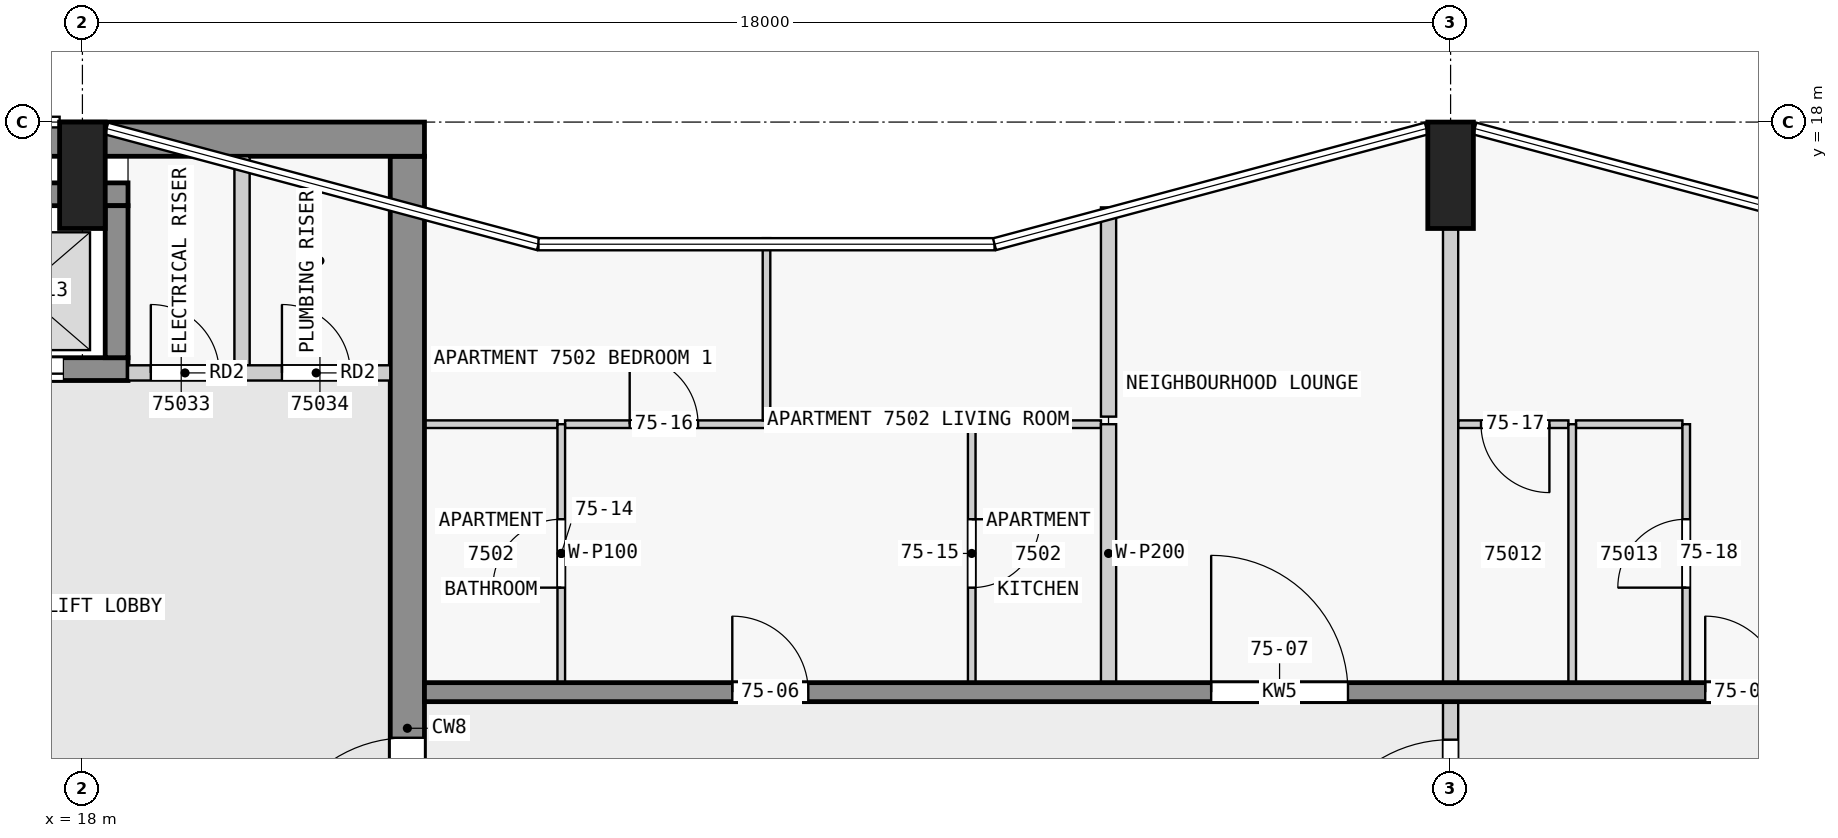
"""IFC4 building model, lengths in metres.
Left out: names, types, materials, properties, quantities, classifications, styles, units other than length and angle.
Written with IfcOpenShell. Run it as: python <this file> out.ifc"""

import sys

from ifc_helpers import new_model, si_unit, direction, frame, frame_2d, origin, origin_2d, place, context, subcontext, project, spatial, rectangle, extrude, element, fill, save


model = new_model("IFC4")
c1 = context("Model", 3, precision=1e-05, world=origin(), true_north=direction((0.0, 1.0)))
c2 = subcontext(c1, "Body", "Model", "MODEL_VIEW")
j1 = project(units=[si_unit("LENGTHUNIT", "METRE"), si_unit("PLANEANGLEUNIT", "RADIAN")], contexts=[c1])
p1 = place(None, origin())
s1 = spatial("IfcSite", under=j1, at=p1, CompositionType="ELEMENT")
p2 = place(p1, origin())
s2 = spatial("IfcBuilding", under=s1, at=p2, CompositionType="ELEMENT")
p3 = place(p2, frame((0.0, 0.0, 284.4)))
s3 = spatial("IfcBuildingStorey", under=s2, at=p3, CompositionType="ELEMENT", Elevation=284.4)
for number, where, z_axis, x_axis in (
    (1, (36.0, 17.3, 0.0), (0.0, 0.0, 1.0), (1.0, 0.0, 0.0)),
    (2, (18.0, 17.3, 0.0), (0.0, 0.0, 1.0), (1.0, 0.0, 0.0)),
):
    element("IfcColumn", number, at=place(p3, frame(where, z_axis=z_axis, x_axis=x_axis)), inside=s3, PredefinedType="COLUMN", context=c2, shape_type="SweptSolid", body=[
        extrude(rectangle(XDim=0.6, YDim=1.4, at=origin_2d()), origin(), (0.0, 0.0, 1.0), 3.5),
    ])
p4 = place(p3, frame((1.85, 17.775, 0.0), z_axis=(0.0, 0.0, 1.0), x_axis=(1.0, 0.0, 0.0)))
e3 = element("IfcWall", 3, at=p4, inside=s3, PredefinedType="SHEAR", context=c2, shape_type="SweptSolid", body=[
    extrude(rectangle(XDim=20.65, YDim=0.45, at=frame_2d((10.325, 0.0))), origin(), (0.0, 0.0, 1.0), 3.05),
])
p5 = place(p3, frame((22.275, 2.5, 0.0), z_axis=(0.0, 0.0, 1.0), x_axis=(0.0, 1.0, 0.0)))
e4 = element("IfcWall", 4, at=p5, inside=s3, PredefinedType="SHEAR", context=c2, shape_type="SweptSolid", body=[
    extrude(rectangle(XDim=15.05, YDim=0.45, at=frame_2d((7.525, 0.0))), origin(), (0.0, 0.0, 1.0), 3.05),
])
p6 = place(p5, frame((5.6, 0.0, 0.0)))
e5 = element("IfcOpeningElement", 5, at=p6, cuts=e4, PredefinedType="OPENING", context=c2, shape_type="SweptSolid", body=[
    extrude(rectangle(XDim=1.8, YDim=2.1, at=frame_2d((0.9, 1.05))), frame((0.0, 0.235, 0.0), z_axis=(0.0, -1.0, 0.0), x_axis=(1.0, 0.0, 0.0)), (0.0, 0.0, 1.0), 0.47),
])
p7 = place(p3, frame((10.8, 17.05, 0.0), z_axis=(0.0, 0.0, 1.0), x_axis=(1.0, 0.0, 0.0)))
e6 = element("IfcWall", 6, at=p7, inside=s3, PredefinedType="SHEAR", context=c2, shape_type="SweptSolid", body=[
    extrude(rectangle(XDim=7.8, YDim=0.3, at=frame_2d((3.9, 0.0))), origin(), (0.0, 0.0, 1.0), 3.05),
])
p8 = place(p3, frame((10.8, 14.75, 0.0), z_axis=(0.0, 0.0, 1.0), x_axis=(1.0, 0.0, 0.0)))
e7 = element("IfcWall", 7, at=p8, inside=s3, PredefinedType="SHEAR", context=c2, shape_type="SweptSolid", body=[
    extrude(rectangle(XDim=7.8, YDim=0.3, at=frame_2d((3.9, 0.0))), origin(), (0.0, 0.0, 1.0), 3.05),
])
p9 = place(p8, frame((0.85, 0.0, 0.0)))
e8 = element("IfcOpeningElement", 8, at=p9, cuts=e7, PredefinedType="OPENING", context=c2, shape_type="SweptSolid", body=[
    extrude(rectangle(XDim=1.1, YDim=2.1, at=frame_2d((0.55, 1.05))), frame((0.0, 0.16, 0.0), z_axis=(0.0, -1.0, 0.0), x_axis=(1.0, 0.0, 0.0)), (0.0, 0.0, 1.0), 0.32),
])
p10 = place(p8, frame((3.35, 0.0, 0.0)))
e9 = element("IfcOpeningElement", 9, at=p10, cuts=e7, PredefinedType="OPENING", context=c2, shape_type="SweptSolid", body=[
    extrude(rectangle(XDim=1.1, YDim=2.1, at=frame_2d((0.55, 1.05))), frame((0.0, 0.16, 0.0), z_axis=(0.0, -1.0, 0.0), x_axis=(1.0, 0.0, 0.0)), (0.0, 0.0, 1.0), 0.32),
])
p11 = place(p8, frame((5.85, 0.0, 0.0)))
e10 = element("IfcOpeningElement", 10, at=p11, cuts=e7, PredefinedType="OPENING", context=c2, shape_type="SweptSolid", body=[
    extrude(rectangle(XDim=1.1, YDim=2.1, at=frame_2d((0.55, 1.05))), frame((0.0, 0.16, 0.0), z_axis=(0.0, -1.0, 0.0), x_axis=(1.0, 0.0, 0.0)), (0.0, 0.0, 1.0), 0.32),
])
p12 = place(p3, frame((18.45, 14.9, 0.0), z_axis=(0.0, 0.0, 1.0), x_axis=(0.0, 1.0, 0.0)))
e11 = element("IfcWall", 11, at=p12, inside=s3, PredefinedType="SHEAR", context=c2, shape_type="SweptSolid", body=[
    extrude(rectangle(XDim=2.0, YDim=0.3, at=frame_2d((1.0, 0.0))), origin(), (0.0, 0.0, 1.0), 3.05),
])
p13 = place(p3, frame((22.5, 10.5, 0.0), z_axis=(0.0, 0.0, 1.0), x_axis=(1.0, 0.0, 0.0)))
e12 = element("IfcWall", 12, at=p13, inside=s3, PredefinedType="SHEAR", context=c2, shape_type="SweptSolid", body=[
    extrude(rectangle(XDim=22.5, YDim=0.25, at=frame_2d((11.25, 0.0))), origin(), (0.0, 0.0, 1.0), 3.05),
])
p14 = place(p13, frame((4.05, 0.0, 0.0)))
e13 = element("IfcOpeningElement", 13, at=p14, cuts=e12, PredefinedType="OPENING", context=c2, shape_type="SweptSolid", body=[
    extrude(rectangle(XDim=1.0, YDim=2.1, at=frame_2d((0.5, 1.05))), frame((0.0, 0.135, 0.0), z_axis=(0.0, -1.0, 0.0), x_axis=(1.0, 0.0, 0.0)), (0.0, 0.0, 1.0), 0.27),
])
p15 = place(p13, frame((10.35, 0.0, 0.0)))
e14 = element("IfcOpeningElement", 14, at=p15, cuts=e12, PredefinedType="OPENING", context=c2, shape_type="SweptSolid", body=[
    extrude(rectangle(XDim=1.8, YDim=2.1, at=frame_2d((0.9, 1.05))), frame((0.0, 0.135, 0.0), z_axis=(0.0, -1.0, 0.0), x_axis=(1.0, 0.0, 0.0)), (0.0, 0.0, 1.0), 0.27),
])
p16 = place(p13, frame((16.85, 0.0, 0.0)))
e15 = element("IfcOpeningElement", 15, at=p16, cuts=e12, PredefinedType="OPENING", context=c2, shape_type="SweptSolid", body=[
    extrude(rectangle(XDim=1.0, YDim=2.1, at=frame_2d((0.5, 1.05))), frame((0.0, 0.135, 0.0), z_axis=(0.0, -1.0, 0.0), x_axis=(1.0, 0.0, 0.0)), (0.0, 0.0, 1.0), 0.27),
])
p17 = place(p3, frame((18.6, 14.7, 0.0), z_axis=(0.0, 0.0, 1.0), x_axis=(1.0, 0.0, 0.0)))
e16 = element("IfcWall", 16, at=p17, inside=s3, PredefinedType="PARTITIONING", context=c2, shape_type="SweptSolid", body=[
    extrude(rectangle(XDim=3.45, YDim=0.2, at=frame_2d((1.725, 0.0))), origin(), (0.0, 0.0, 1.0), 3.05),
])
p18 = place(p17, frame((0.3, 0.0, 0.0)))
e17 = element("IfcOpeningElement", 17, at=p18, cuts=e16, PredefinedType="OPENING", context=c2, shape_type="SweptSolid", body=[
    extrude(rectangle(XDim=0.9, YDim=2.1, at=frame_2d((0.45, 1.05))), frame((0.0, 0.11, 0.0), z_axis=(0.0, -1.0, 0.0), x_axis=(1.0, 0.0, 0.0)), (0.0, 0.0, 1.0), 0.22),
])
p19 = place(p17, frame((2.025, 0.0, 0.0)))
e18 = element("IfcOpeningElement", 18, at=p19, cuts=e16, PredefinedType="OPENING", context=c2, shape_type="SweptSolid", body=[
    extrude(rectangle(XDim=0.9, YDim=2.1, at=frame_2d((0.45, 1.05))), frame((0.0, 0.11, 0.0), z_axis=(0.0, -1.0, 0.0), x_axis=(1.0, 0.0, 0.0)), (0.0, 0.0, 1.0), 0.22),
])
p20 = place(p3, frame((20.1, 14.8, 0.0), z_axis=(0.0, 0.0, 1.0), x_axis=(0.0, 1.0, 0.0)))
e19 = element("IfcWall", 19, at=p20, inside=s3, PredefinedType="PARTITIONING", context=c2, shape_type="SweptSolid", body=[
    extrude(rectangle(XDim=2.75, YDim=0.2, at=frame_2d((1.375, 0.0))), origin(), (0.0, 0.0, 1.0), 3.05),
])
p21 = place(p3, frame((24.25, 14.025, 0.0), z_axis=(0.0, 0.0, 1.0), x_axis=(-1.0, 0.0, 0.0)))
e20 = element("IfcWall", 20, at=p21, inside=s3, PredefinedType="PARTITIONING", context=c2, shape_type="SweptSolid", body=[
    extrude(rectangle(XDim=1.75, YDim=0.1, at=frame_2d((0.875, 0.0))), origin(), (0.0, 0.0, 1.0), 3.05),
])
p22 = place(p3, frame((31.4, 14.025, 0.0), z_axis=(0.0, 0.0, 1.0), x_axis=(-1.0, 0.0, 0.0)))
e21 = element("IfcWall", 21, at=p22, inside=s3, PredefinedType="PARTITIONING", context=c2, shape_type="SweptSolid", body=[
    extrude(rectangle(XDim=1.65, YDim=0.1, at=frame_2d((0.825, 0.0))), origin(), (0.0, 0.0, 1.0), 3.05),
])
p23 = place(p3, frame((37.55, 14.025, 0.0), z_axis=(0.0, 0.0, 1.0), x_axis=(-1.0, 0.0, 0.0)))
e22 = element("IfcWall", 22, at=p23, inside=s3, PredefinedType="PARTITIONING", context=c2, shape_type="SweptSolid", body=[
    extrude(rectangle(XDim=1.45, YDim=0.1, at=frame_2d((0.725, 0.0))), origin(), (0.0, 0.0, 1.0), 3.05),
])
p24 = place(p23, frame((0.25, 0.0, 0.0)))
e23 = element("IfcOpeningElement", 23, at=p24, cuts=e22, PredefinedType="OPENING", context=c2, shape_type="SweptSolid", body=[
    extrude(rectangle(XDim=0.9, YDim=2.1, at=frame_2d((0.45, 1.05))), frame((0.0, 0.06, 0.0), z_axis=(0.0, -1.0, 0.0), x_axis=(1.0, 0.0, 0.0)), (0.0, 0.0, 1.0), 0.12),
])
p25 = place(p3, frame((39.05, 14.025, 0.0), z_axis=(0.0, 0.0, 1.0), x_axis=(-1.0, 0.0, 0.0)))
e24 = element("IfcWall", 24, at=p25, inside=s3, PredefinedType="PARTITIONING", context=c2, shape_type="SweptSolid", body=[
    extrude(rectangle(XDim=1.4, YDim=0.1, at=frame_2d((0.7, 0.0))), origin(), (0.0, 0.0, 1.0), 3.05),
])
p26 = place(p3, frame((24.35, 14.025, 0.0), z_axis=(0.0, 0.0, 1.0), x_axis=(1.0, 0.0, 0.0)))
e25 = element("IfcWall", 25, at=p26, inside=s3, PredefinedType="PARTITIONING", context=c2, shape_type="SweptSolid", body=[
    extrude(rectangle(XDim=2.65, YDim=0.1, at=frame_2d((1.325, 0.0))), origin(), (0.0, 0.0, 1.0), 3.05),
])
p27 = place(p26, frame((0.85, 0.0, 0.0)))
e26 = element("IfcOpeningElement", 26, at=p27, cuts=e25, PredefinedType="OPENING", context=c2, shape_type="SweptSolid", body=[
    extrude(rectangle(XDim=0.9, YDim=2.1, at=frame_2d((0.45, 1.05))), frame((0.0, 0.06, 0.0), z_axis=(0.0, -1.0, 0.0), x_axis=(1.0, 0.0, 0.0)), (0.0, 0.0, 1.0), 0.12),
])
p28 = place(p3, frame((24.3, 10.625, 0.0), z_axis=(0.0, 0.0, 1.0), x_axis=(0.0, 1.0, 0.0)))
e27 = element("IfcWall", 27, at=p28, inside=s3, PredefinedType="PARTITIONING", context=c2, shape_type="SweptSolid", body=[
    extrude(rectangle(XDim=3.4, YDim=0.1, at=frame_2d((1.7, 0.0))), origin(), (0.0, 0.0, 1.0), 3.05),
])
p29 = place(p28, frame((1.25, 0.0, 0.0)))
e28 = element("IfcOpeningElement", 28, at=p29, cuts=e27, PredefinedType="OPENING", context=c2, shape_type="SweptSolid", body=[
    extrude(rectangle(XDim=0.9, YDim=2.1, at=frame_2d((0.45, 1.05))), frame((0.0, 0.06, 0.0), z_axis=(0.0, -1.0, 0.0), x_axis=(1.0, 0.0, 0.0)), (0.0, 0.0, 1.0), 0.12),
])
p30 = place(p3, frame((27.0, 14.075, 0.0), z_axis=(0.0, 0.0, 1.0), x_axis=(0.0, 1.0, 0.0)))
e29 = element("IfcWall", 29, at=p30, inside=s3, PredefinedType="PARTITIONING", context=c2, shape_type="SweptSolid", body=[
    extrude(rectangle(XDim=2.398, YDim=0.1, at=frame_2d((1.199, 0.0))), origin(), (0.0, 0.0, 1.0), 3.05),
])
p31 = place(p3, frame((29.7, 14.025, 0.0), z_axis=(0.0, 0.0, 1.0), x_axis=(0.0, -1.0, 0.0)))
e30 = element("IfcWall", 30, at=p31, inside=s3, PredefinedType="PARTITIONING", context=c2, shape_type="SweptSolid", body=[
    extrude(rectangle(XDim=3.4, YDim=0.1, at=frame_2d((1.7, 0.0))), origin(), (0.0, 0.0, 1.0), 3.05),
])
p32 = place(p31, frame((1.25, 0.0, 0.0)))
e31 = element("IfcOpeningElement", 31, at=p32, cuts=e30, PredefinedType="OPENING", context=c2, shape_type="SweptSolid", body=[
    extrude(rectangle(XDim=0.9, YDim=2.1, at=frame_2d((0.45, 1.05))), frame((0.0, 0.06, 0.0), z_axis=(0.0, -1.0, 0.0), x_axis=(1.0, 0.0, 0.0)), (0.0, 0.0, 1.0), 0.12),
])
p33 = place(p3, frame((31.5, 16.878, 0.0), z_axis=(0.0, 0.0, 1.0), x_axis=(0.0, -1.0, 0.0)))
e32 = element("IfcWall", 32, at=p33, inside=s3, PredefinedType="PARTITIONING", context=c2, shape_type="SweptSolid", body=[
    extrude(rectangle(XDim=2.753, YDim=0.2, at=frame_2d((1.376, 0.0))), origin(), (0.0, 0.0, 1.0), 3.05),
])
p34 = place(p3, frame((31.5, 10.625, 0.0), z_axis=(0.0, 0.0, 1.0), x_axis=(0.0, 1.0, 0.0)))
e33 = element("IfcWall", 33, at=p34, inside=s3, PredefinedType="PARTITIONING", context=c2, shape_type="SweptSolid", body=[
    extrude(rectangle(XDim=3.4, YDim=0.2, at=frame_2d((1.7, 0.0))), origin(), (0.0, 0.0, 1.0), 3.05),
])
p35 = place(p3, frame((36.0, 10.625, 0.0), z_axis=(0.0, 0.0, 1.0), x_axis=(0.0, 1.0, 0.0)))
e34 = element("IfcWall", 34, at=p35, inside=s3, PredefinedType="PARTITIONING", context=c2, shape_type="SweptSolid", body=[
    extrude(rectangle(XDim=5.975, YDim=0.2, at=frame_2d((2.988, 0.0))), origin(), (0.0, 0.0, 1.0), 3.05),
])
p36 = place(p3, frame((37.6, 10.625, 0.0), z_axis=(0.0, 0.0, 1.0), x_axis=(0.0, 1.0, 0.0)))
e35 = element("IfcWall", 35, at=p36, inside=s3, PredefinedType="PARTITIONING", context=c2, shape_type="SweptSolid", body=[
    extrude(rectangle(XDim=3.4, YDim=0.1, at=frame_2d((1.7, 0.0))), origin(), (0.0, 0.0, 1.0), 3.05),
])
p37 = place(p3, frame((39.1, 10.625, 0.0), z_axis=(0.0, 0.0, 1.0), x_axis=(0.0, 1.0, 0.0)))
e36 = element("IfcWall", 36, at=p37, inside=s3, PredefinedType="PARTITIONING", context=c2, shape_type="SweptSolid", body=[
    extrude(rectangle(XDim=3.4, YDim=0.1, at=frame_2d((1.7, 0.0))), origin(), (0.0, 0.0, 1.0), 3.05),
])
p38 = place(p37, frame((1.25, 0.0, 0.0)))
e37 = element("IfcOpeningElement", 37, at=p38, cuts=e36, PredefinedType="OPENING", context=c2, shape_type="SweptSolid", body=[
    extrude(rectangle(XDim=0.9, YDim=2.1, at=frame_2d((0.45, 1.05))), frame((0.0, 0.06, 0.0), z_axis=(0.0, -1.0, 0.0), x_axis=(1.0, 0.0, 0.0)), (0.0, 0.0, 1.0), 0.12),
])
p39 = place(p3, frame((36.0, 7.475, 0.0), z_axis=(0.0, 0.0, 1.0), x_axis=(0.0, 1.0, 0.0)))
e38 = element("IfcWall", 38, at=p39, inside=s3, PredefinedType="PARTITIONING", context=c2, shape_type="SweptSolid", body=[
    extrude(rectangle(XDim=3.05, YDim=0.2, at=frame_2d((1.525, 0.0))), origin(), (0.0, 0.0, 1.0), 3.05),
])
p40 = place(p39, frame((0.6, 0.0, 0.0)))
e39 = element("IfcOpeningElement", 39, at=p40, cuts=e38, PredefinedType="OPENING", context=c2, shape_type="SweptSolid", body=[
    extrude(rectangle(XDim=1.8, YDim=2.1, at=frame_2d((0.9, 1.05))), frame((0.0, 0.11, 0.0), z_axis=(0.0, -1.0, 0.0), x_axis=(1.0, 0.0, 0.0)), (0.0, 0.0, 1.0), 0.22),
])
p41 = place(p11, origin())
e40 = element("IfcDoor", 40, at=p41, inside=s3, OperationType="DOUBLE_DOOR_SLIDING", PredefinedType="DOOR", context=c2, shape_type="SweptSolid", body=[
    extrude(rectangle(XDim=1.1, YDim=2.1, at=frame_2d((0.55, 1.05))), frame((0.0, 0.025, 0.0), z_axis=(0.0, -1.0, 0.0), x_axis=(1.0, 0.0, 0.0)), (0.0, 0.0, 1.0), 0.05),
])
fill(e10, e40)
p42 = place(p6, origin())
e41 = element("IfcDoor", 41, at=p42, inside=s3, OperationType="DOUBLE_DOOR_SINGLE_SWING", PredefinedType="DOOR", context=c2, shape_type="SweptSolid", body=[
    extrude(rectangle(XDim=1.8, YDim=2.1, at=frame_2d((0.9, 1.05))), frame((0.0, 0.025, 0.0), z_axis=(0.0, -1.0, 0.0), x_axis=(1.0, 0.0, 0.0)), (0.0, 0.0, 1.0), 0.05),
])
fill(e5, e41)
p43 = place(p18, origin())
e42 = element("IfcDoor", 42, at=p43, inside=s3, OperationType="SINGLE_SWING_LEFT", PredefinedType="DOOR", context=c2, shape_type="SweptSolid", body=[
    extrude(rectangle(XDim=0.9, YDim=2.1, at=frame_2d((0.45, 1.05))), frame((0.0, 0.025, 0.0), z_axis=(0.0, -1.0, 0.0), x_axis=(1.0, 0.0, 0.0)), (0.0, 0.0, 1.0), 0.05),
])
fill(e17, e42)
p44 = place(p19, origin())
e43 = element("IfcDoor", 43, at=p44, inside=s3, OperationType="SINGLE_SWING_LEFT", PredefinedType="DOOR", context=c2, shape_type="SweptSolid", body=[
    extrude(rectangle(XDim=0.9, YDim=2.1, at=frame_2d((0.45, 1.05))), frame((0.0, 0.025, 0.0), z_axis=(0.0, -1.0, 0.0), x_axis=(1.0, 0.0, 0.0)), (0.0, 0.0, 1.0), 0.05),
])
fill(e18, e43)
p45 = place(p14, origin())
e44 = element("IfcDoor", 44, at=p45, inside=s3, OperationType="SINGLE_SWING_LEFT", PredefinedType="DOOR", context=c2, shape_type="SweptSolid", body=[
    extrude(rectangle(XDim=1.0, YDim=2.1, at=frame_2d((0.5, 1.05))), frame((0.0, 0.025, 0.0), z_axis=(0.0, -1.0, 0.0), x_axis=(1.0, 0.0, 0.0)), (0.0, 0.0, 1.0), 0.05),
])
fill(e13, e44)
p46 = place(p15, origin())
e45 = element("IfcDoor", 45, at=p46, inside=s3, OperationType="SINGLE_SWING_LEFT", PredefinedType="DOOR", context=c2, shape_type="SweptSolid", body=[
    extrude(rectangle(XDim=1.8, YDim=2.1, at=frame_2d((0.9, 1.05))), frame((0.0, 0.025, 0.0), z_axis=(0.0, -1.0, 0.0), x_axis=(1.0, 0.0, 0.0)), (0.0, 0.0, 1.0), 0.05),
])
fill(e14, e45)
p47 = place(p16, origin())
e46 = element("IfcDoor", 46, at=p47, inside=s3, OperationType="SINGLE_SWING_RIGHT", PredefinedType="DOOR", context=c2, shape_type="SweptSolid", body=[
    extrude(rectangle(XDim=1.0, YDim=2.1, at=frame_2d((0.5, 1.05))), frame((0.0, 0.025, 0.0), z_axis=(0.0, -1.0, 0.0), x_axis=(1.0, 0.0, 0.0)), (0.0, 0.0, 1.0), 0.05),
])
fill(e15, e46)
p48 = place(p40, origin())
e47 = element("IfcDoor", 47, at=p48, inside=s3, OperationType="SINGLE_SWING_LEFT", PredefinedType="DOOR", context=c2, shape_type="SweptSolid", body=[
    extrude(rectangle(XDim=1.8, YDim=2.1, at=frame_2d((0.9, 1.05))), frame((0.0, 0.025, 0.0), z_axis=(0.0, -1.0, 0.0), x_axis=(1.0, 0.0, 0.0)), (0.0, 0.0, 1.0), 0.05),
])
fill(e39, e47)
p49 = place(p29, origin())
e48 = element("IfcDoor", 48, at=p49, inside=s3, OperationType="SINGLE_SWING_LEFT", PredefinedType="DOOR", context=c2, shape_type="SweptSolid", body=[
    extrude(rectangle(XDim=0.9, YDim=2.1, at=frame_2d((0.45, 1.05))), frame((0.0, 0.025, 0.0), z_axis=(0.0, -1.0, 0.0), x_axis=(1.0, 0.0, 0.0)), (0.0, 0.0, 1.0), 0.05),
])
fill(e28, e48)
p50 = place(p32, origin())
e49 = element("IfcDoor", 49, at=p50, inside=s3, OperationType="SINGLE_SWING_LEFT", PredefinedType="DOOR", context=c2, shape_type="SweptSolid", body=[
    extrude(rectangle(XDim=0.9, YDim=2.1, at=frame_2d((0.45, 1.05))), frame((0.0, 0.025, 0.0), z_axis=(0.0, -1.0, 0.0), x_axis=(1.0, 0.0, 0.0)), (0.0, 0.0, 1.0), 0.05),
])
fill(e31, e49)
p51 = place(p27, origin())
e50 = element("IfcDoor", 50, at=p51, inside=s3, OperationType="SINGLE_SWING_LEFT", PredefinedType="DOOR", context=c2, shape_type="SweptSolid", body=[
    extrude(rectangle(XDim=0.9, YDim=2.1, at=frame_2d((0.45, 1.05))), frame((0.0, 0.025, 0.0), z_axis=(0.0, -1.0, 0.0), x_axis=(1.0, 0.0, 0.0)), (0.0, 0.0, 1.0), 0.05),
])
fill(e26, e50)
p52 = place(p24, origin())
e51 = element("IfcDoor", 51, at=p52, inside=s3, OperationType="SINGLE_SWING_LEFT", PredefinedType="DOOR", context=c2, shape_type="SweptSolid", body=[
    extrude(rectangle(XDim=0.9, YDim=2.1, at=frame_2d((0.45, 1.05))), frame((0.0, 0.025, 0.0), z_axis=(0.0, -1.0, 0.0), x_axis=(1.0, 0.0, 0.0)), (0.0, 0.0, 1.0), 0.05),
])
fill(e23, e51)
p53 = place(p38, origin())
e52 = element("IfcDoor", 52, at=p53, inside=s3, OperationType="SINGLE_SWING_LEFT", PredefinedType="DOOR", context=c2, shape_type="SweptSolid", body=[
    extrude(rectangle(XDim=0.9, YDim=2.1, at=frame_2d((0.45, 1.05))), frame((0.0, 0.025, 0.0), z_axis=(0.0, -1.0, 0.0), x_axis=(1.0, 0.0, 0.0)), (0.0, 0.0, 1.0), 0.05),
])
fill(e37, e52)
save(model, sys.argv[1])
